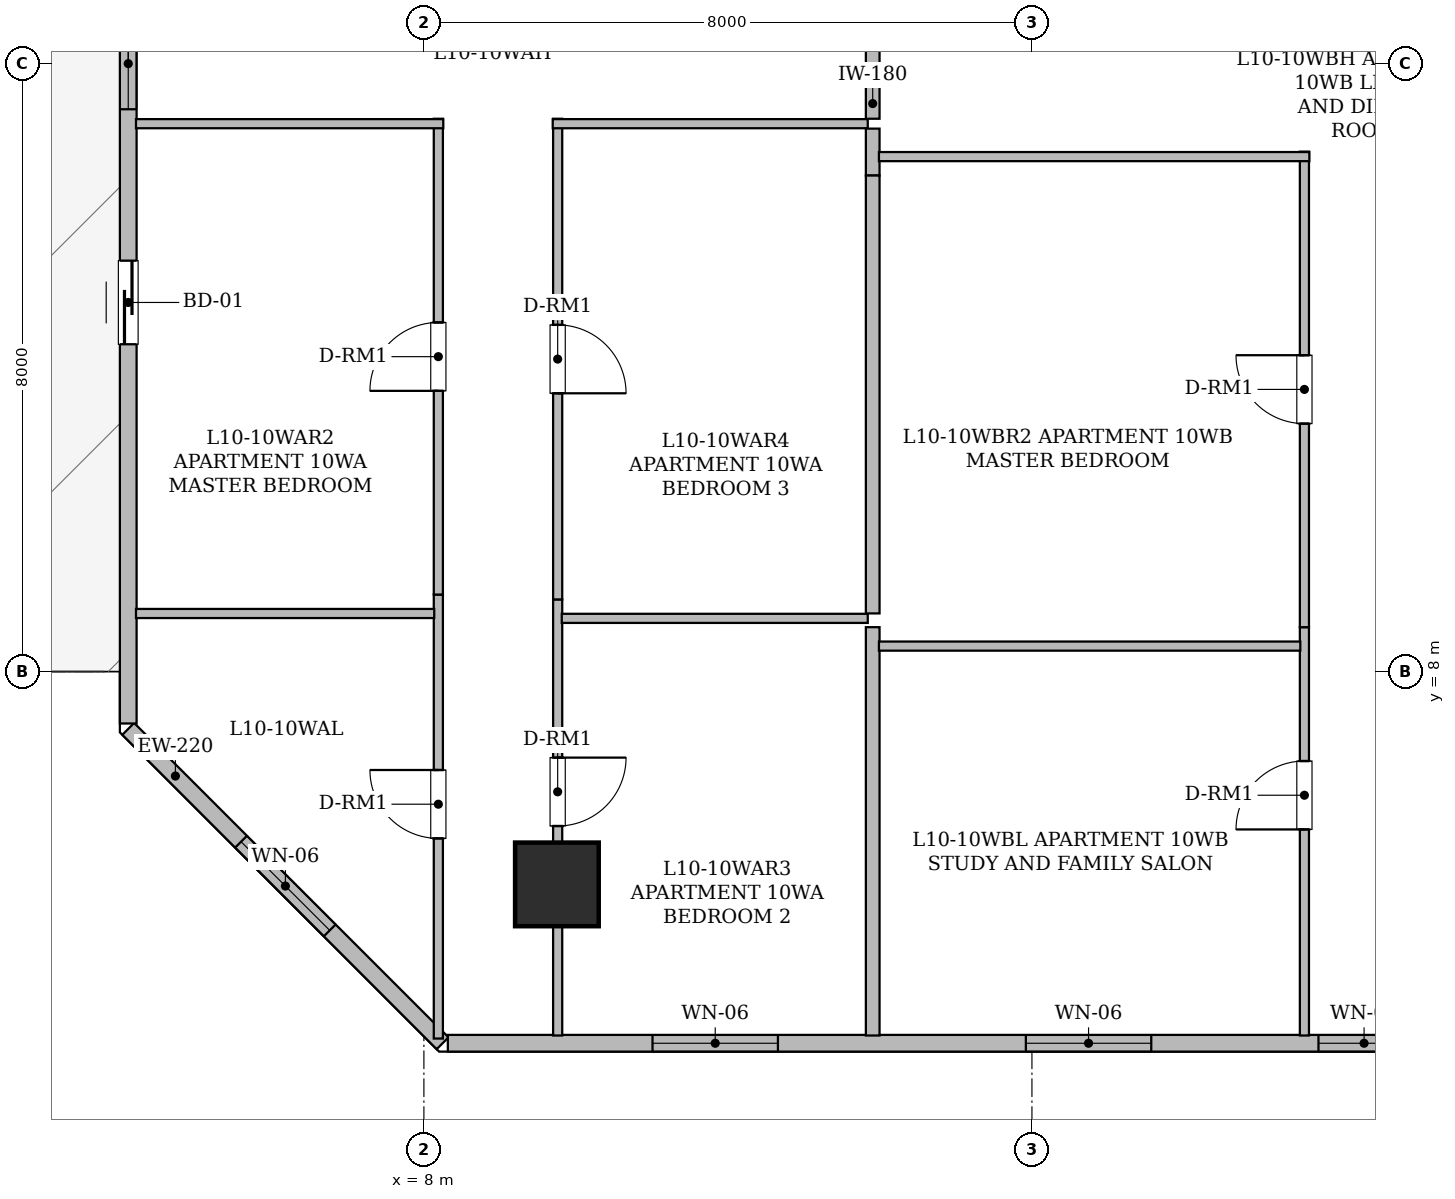
"""IFC4 building model, lengths in metres.
Left out: names, types, materials, properties, quantities, classifications, styles, units other than length and angle.
Written with IfcOpenShell. Run it as: python <this file> out.ifc"""

import sys

from ifc_helpers import new_model, si_unit, direction, frame, frame_2d, origin, origin_2d, place, context, subcontext, project, spatial, rectangle, hollow_rectangle, extrude, element, fill, save


model = new_model("IFC4")
c1 = context("Model", 3, precision=1e-05, world=origin(), true_north=direction((0.0, 1.0)))
c2 = subcontext(c1, "Body", "Model", "MODEL_VIEW")
j1 = project(units=[si_unit("LENGTHUNIT", "METRE"), si_unit("PLANEANGLEUNIT", "RADIAN")], contexts=[c1])
p1 = place(None, origin())
s1 = spatial("IfcSite", under=j1, at=p1, CompositionType="ELEMENT")
p2 = place(p1, origin())
s2 = spatial("IfcBuilding", under=s1, at=p2, CompositionType="ELEMENT")
p3 = place(p2, frame((0.0, 0.0, 44.25)))
s3 = spatial("IfcBuildingStorey", under=s2, at=p3, CompositionType="ELEMENT", Elevation=44.25)
p4 = place(p3, frame((9.75, 5.2, 0.0), z_axis=(0.0, 0.0, 1.0), x_axis=(1.0, 0.0, 0.0)))
e1 = element("IfcColumn", 1, at=p4, inside=s3, PredefinedType="COLUMN", context=c2, shape_type="SweptSolid", body=[
    extrude(hollow_rectangle(XDim=1.1, YDim=1.1, WallThickness=0.055, at=origin_2d()), origin(), (0.0, 0.0, 1.0), 3.65),
])
p5 = place(p3, frame((8.246, 3.11, 0.0), z_axis=(0.0, 0.0, 1.0), x_axis=(-0.707106781187, 0.707106781187, 0.0)))
e2 = element("IfcWall", 2, at=p5, inside=s3, PredefinedType="STANDARD", context=c2, shape_type="SweptSolid", body=[
    extrude(rectangle(XDim=5.849, YDim=0.22, at=frame_2d((2.925, 0.0))), origin(), (0.0, 0.0, 1.0), 3.43),
])
p6 = place(p5, frame((2.1, 0.0, 0.85)))
e3 = element("IfcOpeningElement", 3, at=p6, cuts=e2, PredefinedType="OPENING", context=c2, shape_type="SweptSolid", body=[
    extrude(rectangle(XDim=1.65, YDim=1.55, at=frame_2d((0.825, 0.775))), frame((0.0, 0.12, 0.0), z_axis=(0.0, -1.0, 0.0), x_axis=(1.0, 0.0, 0.0)), (0.0, 0.0, 1.0), 0.24),
])
p7 = place(p3, frame((4.11, 7.317, 0.0), z_axis=(0.0, 0.0, 1.0), x_axis=(0.0, 1.0, 0.0)))
e4 = element("IfcWall", 4, at=p7, inside=s3, PredefinedType="STANDARD", context=c2, shape_type="SweptSolid", body=[
    extrude(rectangle(XDim=17.446, YDim=0.22, at=frame_2d((8.723, 0.0))), origin(), (0.0, 0.0, 1.0), 3.43),
])
p8 = place(p7, frame((4.989, 0.0, 0.0)))
e5 = element("IfcOpeningElement", 5, at=p8, cuts=e4, PredefinedType="OPENING", context=c2, shape_type="SweptSolid", body=[
    extrude(rectangle(XDim=1.1, YDim=2.2, at=frame_2d((0.55, 1.1))), frame((0.0, 0.12, 0.0), z_axis=(0.0, -1.0, 0.0), x_axis=(1.0, 0.0, 0.0)), (0.0, 0.0, 1.0), 0.24),
])
p9 = place(p7, frame((8.081, 0.0, 0.8)))
e6 = element("IfcOpeningElement", 6, at=p9, cuts=e4, PredefinedType="OPENING", context=c2, shape_type="SweptSolid", body=[
    extrude(rectangle(XDim=1.2, YDim=1.5, at=frame_2d((0.6, 0.75))), frame((0.0, 0.12, 0.0), z_axis=(0.0, -1.0, 0.0), x_axis=(1.0, 0.0, 0.0)), (0.0, 0.0, 1.0), 0.24),
])
p10 = place(p3, frame((45.683, 3.11, 0.0), z_axis=(0.0, 0.0, 1.0), x_axis=(-1.0, 0.0, 0.0)))
e7 = element("IfcWall", 7, at=p10, inside=s3, PredefinedType="STANDARD", context=c2, shape_type="SweptSolid", body=[
    extrude(rectangle(XDim=37.368, YDim=0.22, at=frame_2d((18.684, 0.0))), origin(), (0.0, 0.0, 1.0), 3.43),
])
p11 = place(p10, frame((14.508, 0.0, 0.85)))
e8 = element("IfcOpeningElement", 8, at=p11, cuts=e7, PredefinedType="OPENING", context=c2, shape_type="SweptSolid", body=[
    extrude(rectangle(XDim=1.65, YDim=1.55, at=frame_2d((0.825, 0.775))), frame((0.0, 0.12, 0.0), z_axis=(0.0, -1.0, 0.0), x_axis=(1.0, 0.0, 0.0)), (0.0, 0.0, 1.0), 0.24),
])
p12 = place(p10, frame((33.025, 0.0, 0.85)))
e9 = element("IfcOpeningElement", 9, at=p12, cuts=e7, PredefinedType="OPENING", context=c2, shape_type="SweptSolid", body=[
    extrude(rectangle(XDim=1.65, YDim=1.55, at=frame_2d((0.825, 0.775))), frame((0.0, 0.12, 0.0), z_axis=(0.0, -1.0, 0.0), x_axis=(1.0, 0.0, 0.0)), (0.0, 0.0, 1.0), 0.24),
])
p13 = place(p10, frame((24.713, 0.0, 0.8)))
e10 = element("IfcOpeningElement", 10, at=p13, cuts=e7, PredefinedType="OPENING", context=c2, shape_type="SweptSolid", body=[
    extrude(rectangle(XDim=1.2, YDim=1.5, at=frame_2d((0.6, 0.75))), frame((0.0, 0.12, 0.0), z_axis=(0.0, -1.0, 0.0), x_axis=(1.0, 0.0, 0.0)), (0.0, 0.0, 1.0), 0.24),
])
p14 = place(p10, frame((28.113, 0.0, 0.85)))
e11 = element("IfcOpeningElement", 11, at=p14, cuts=e7, PredefinedType="OPENING", context=c2, shape_type="SweptSolid", body=[
    extrude(rectangle(XDim=1.65, YDim=1.55, at=frame_2d((0.825, 0.775))), frame((0.0, 0.12, 0.0), z_axis=(0.0, -1.0, 0.0), x_axis=(1.0, 0.0, 0.0)), (0.0, 0.0, 1.0), 0.24),
])
p15 = place(p10, frame((20.863, 0.0, 0.85)))
e12 = element("IfcOpeningElement", 12, at=p15, cuts=e7, PredefinedType="OPENING", context=c2, shape_type="SweptSolid", body=[
    extrude(rectangle(XDim=1.65, YDim=1.55, at=frame_2d((0.825, 0.775))), frame((0.0, 0.12, 0.0), z_axis=(0.0, -1.0, 0.0), x_axis=(1.0, 0.0, 0.0)), (0.0, 0.0, 1.0), 0.24),
])
p16 = place(p10, frame((10.428, 0.0, 0.8)))
e13 = element("IfcOpeningElement", 13, at=p16, cuts=e7, PredefinedType="OPENING", context=c2, shape_type="SweptSolid", body=[
    extrude(rectangle(XDim=1.2, YDim=1.5, at=frame_2d((0.6, 0.75))), frame((0.0, 0.12, 0.0), z_axis=(0.0, -1.0, 0.0), x_axis=(1.0, 0.0, 0.0)), (0.0, 0.0, 1.0), 0.24),
])
p17 = place(p10, frame((6.453, 0.0, 0.85)))
e14 = element("IfcOpeningElement", 14, at=p17, cuts=e7, PredefinedType="OPENING", context=c2, shape_type="SweptSolid", body=[
    extrude(rectangle(XDim=1.65, YDim=1.55, at=frame_2d((0.825, 0.775))), frame((0.0, 0.12, 0.0), z_axis=(0.0, -1.0, 0.0), x_axis=(1.0, 0.0, 0.0)), (0.0, 0.0, 1.0), 0.24),
])
p18 = place(p10, frame((2.157, 0.0, 0.85)))
e15 = element("IfcOpeningElement", 15, at=p18, cuts=e7, PredefinedType="OPENING", context=c2, shape_type="SweptSolid", body=[
    extrude(rectangle(XDim=1.65, YDim=1.55, at=frame_2d((0.825, 0.775))), frame((0.0, 0.12, 0.0), z_axis=(0.0, -1.0, 0.0), x_axis=(1.0, 0.0, 0.0)), (0.0, 0.0, 1.0), 0.24),
])
p19 = place(p3, frame((8.19, 3.172, 0.0), z_axis=(0.0, 0.0, 1.0), x_axis=(0.0, 1.0, 0.0)))
e16 = element("IfcWall", 16, at=p19, inside=s3, PredefinedType="PARTITIONING", context=c2, shape_type="SweptSolid", body=[
    extrude(rectangle(XDim=5.841, YDim=0.12, at=frame_2d((2.92, 0.0))), origin(), (0.0, 0.0, 1.0), 2.803),
])
p20 = place(p19, frame((2.633, 0.0, 0.0)))
e17 = element("IfcOpeningElement", 17, at=p20, cuts=e16, PredefinedType="OPENING", context=c2, shape_type="SweptSolid", body=[
    extrude(rectangle(XDim=0.9, YDim=2.1, at=frame_2d((0.45, 1.05))), frame((0.0, 0.07, 0.0), z_axis=(0.0, -1.0, 0.0), x_axis=(1.0, 0.0, 0.0)), (0.0, 0.0, 1.0), 0.14),
])
p21 = place(p3, frame((8.19, 9.013, 0.0), z_axis=(0.0, 0.0, 1.0), x_axis=(0.0, 1.0, 0.0)))
e18 = element("IfcWall", 18, at=p21, inside=s3, PredefinedType="PARTITIONING", context=c2, shape_type="SweptSolid", body=[
    extrude(rectangle(XDim=6.26, YDim=0.12, at=frame_2d((3.13, 0.0))), origin(), (0.0, 0.0, 1.0), 2.803),
])
p22 = place(p21, frame((2.68, 0.0, 0.0)))
e19 = element("IfcOpeningElement", 19, at=p22, cuts=e18, PredefinedType="OPENING", context=c2, shape_type="SweptSolid", body=[
    extrude(rectangle(XDim=0.9, YDim=2.1, at=frame_2d((0.45, 1.05))), frame((0.0, 0.07, 0.0), z_axis=(0.0, -1.0, 0.0), x_axis=(1.0, 0.0, 0.0)), (0.0, 0.0, 1.0), 0.14),
])
p23 = place(p3, frame((8.255, 15.208, 0.0), z_axis=(0.0, 0.0, 1.0), x_axis=(-1.0, 0.0, 0.0)))
e20 = element("IfcWall", 20, at=p23, inside=s3, PredefinedType="PARTITIONING", context=c2, shape_type="SweptSolid", body=[
    extrude(rectangle(XDim=4.043, YDim=0.12, at=frame_2d((2.021, 0.0))), origin(), (0.0, 0.0, 1.0), 2.803),
])
p24 = place(p3, frame((9.76, 8.949, 0.0), z_axis=(0.0, 0.0, 1.0), x_axis=(0.0, -1.0, 0.0)))
e21 = element("IfcWall", 21, at=p24, inside=s3, PredefinedType="PARTITIONING", context=c2, shape_type="SweptSolid", body=[
    extrude(rectangle(XDim=5.737, YDim=0.12, at=frame_2d((2.869, 0.0))), origin(), (0.0, 0.0, 1.0), 2.647),
])
p25 = place(p24, frame((2.081, 0.0, 0.0)))
e22 = element("IfcOpeningElement", 22, at=p25, cuts=e21, PredefinedType="OPENING", context=c2, shape_type="SweptSolid", body=[
    extrude(rectangle(XDim=0.9, YDim=2.1, at=frame_2d((0.45, 1.05))), frame((0.0, 0.07, 0.0), z_axis=(0.0, -1.0, 0.0), x_axis=(1.0, 0.0, 0.0)), (0.0, 0.0, 1.0), 0.14),
])
p26 = place(p3, frame((9.76, 15.273, 0.0), z_axis=(0.0, 0.0, 1.0), x_axis=(0.0, -1.0, 0.0)))
e23 = element("IfcWall", 23, at=p26, inside=s3, PredefinedType="PARTITIONING", context=c2, shape_type="SweptSolid", body=[
    extrude(rectangle(XDim=6.324, YDim=0.12, at=frame_2d((3.162, 0.0))), origin(), (0.0, 0.0, 1.0), 3.43),
])
p27 = place(p26, frame((2.712, 0.0, 0.0)))
e24 = element("IfcOpeningElement", 24, at=p27, cuts=e23, PredefinedType="OPENING", context=c2, shape_type="SweptSolid", body=[
    extrude(rectangle(XDim=0.9, YDim=2.1, at=frame_2d((0.45, 1.05))), frame((0.0, 0.07, 0.0), z_axis=(0.0, -1.0, 0.0), x_axis=(1.0, 0.0, 0.0)), (0.0, 0.0, 1.0), 0.14),
])
p28 = place(p3, frame((13.84, 15.208, 0.0), z_axis=(0.0, 0.0, 1.0), x_axis=(-1.0, 0.0, 0.0)))
e25 = element("IfcWall", 25, at=p28, inside=s3, PredefinedType="PARTITIONING", context=c2, shape_type="SweptSolid", body=[
    extrude(rectangle(XDim=4.145, YDim=0.12, at=frame_2d((2.073, 0.0))), origin(), (0.0, 0.0, 1.0), 3.43),
])
p29 = place(p3, frame((13.905, 16.604, 0.0), z_axis=(0.0, 0.0, 1.0), x_axis=(0.0, -1.0, 0.0)))
e26 = element("IfcWall", 26, at=p29, inside=s3, PredefinedType="STANDARD", context=c2, shape_type="SweptSolid", body=[
    extrude(rectangle(XDim=1.331, YDim=0.18, at=frame_2d((0.666, 0.0))), origin(), (0.0, 0.0, 1.0), 3.43),
])
p30 = place(p3, frame((4.212, 8.764, 0.0), z_axis=(0.0, 0.0, 1.0), x_axis=(1.0, 0.0, 0.0)))
e27 = element("IfcWall", 27, at=p30, inside=s3, PredefinedType="PARTITIONING", context=c2, shape_type="SweptSolid", body=[
    extrude(rectangle(XDim=3.924, YDim=0.12, at=frame_2d((1.962, 0.0))), origin(), (0.0, 0.0, 1.0), 3.43),
])
p31 = place(p3, frame((9.814, 8.7, 0.0), z_axis=(0.0, 0.0, 1.0), x_axis=(1.0, 0.0, 0.0)))
e28 = element("IfcWall", 28, at=p31, inside=s3, PredefinedType="PARTITIONING", context=c2, shape_type="SweptSolid", body=[
    extrude(rectangle(XDim=4.026, YDim=0.12, at=frame_2d((2.013, 0.0))), origin(), (0.0, 0.0, 1.0), 2.647),
])
p32 = place(p3, frame((13.905, 8.584, 0.0), z_axis=(0.0, 0.0, 1.0), x_axis=(0.0, -1.0, 0.0)))
e29 = element("IfcWall", 29, at=p32, inside=s3, PredefinedType="STANDARD", context=c2, shape_type="SweptSolid", body=[
    extrude(rectangle(XDim=5.372, YDim=0.18, at=frame_2d((2.686, 0.0))), origin(), (0.0, 0.0, 1.0), 2.803),
])
p33 = place(p3, frame((13.905, 15.143, 0.0), z_axis=(0.0, 0.0, 1.0), x_axis=(0.0, -1.0, 0.0)))
e30 = element("IfcWall", 30, at=p33, inside=s3, PredefinedType="STANDARD", context=c2, shape_type="SweptSolid", body=[
    extrude(rectangle(XDim=0.617, YDim=0.18, at=frame_2d((0.309, 0.0))), origin(), (0.0, 0.0, 1.0), 3.43),
])
p34 = place(p3, frame((13.905, 14.526, 0.0), z_axis=(0.0, 0.0, 1.0), x_axis=(0.0, -1.0, 0.0)))
e31 = element("IfcWall", 31, at=p34, inside=s3, PredefinedType="STANDARD", context=c2, shape_type="SweptSolid", body=[
    extrude(rectangle(XDim=5.761, YDim=0.18, at=frame_2d((2.88, 0.0))), origin(), (0.0, 0.0, 1.0), 2.647),
])
p35 = place(p3, frame((19.585, 3.212, 0.0), z_axis=(0.0, 0.0, 1.0), x_axis=(0.0, 1.0, 0.0)))
e32 = element("IfcWall", 32, at=p35, inside=s3, PredefinedType="PARTITIONING", context=c2, shape_type="SweptSolid", body=[
    extrude(rectangle(XDim=5.372, YDim=0.12, at=frame_2d((2.686, 0.0))), origin(), (0.0, 0.0, 1.0), 2.803),
])
p36 = place(p35, frame((2.711, 0.0, 0.0)))
e33 = element("IfcOpeningElement", 33, at=p36, cuts=e32, PredefinedType="OPENING", context=c2, shape_type="SweptSolid", body=[
    extrude(rectangle(XDim=0.9, YDim=2.1, at=frame_2d((0.45, 1.05))), frame((0.0, 0.07, 0.0), z_axis=(0.0, -1.0, 0.0), x_axis=(1.0, 0.0, 0.0)), (0.0, 0.0, 1.0), 0.14),
])
p37 = place(p3, frame((19.585, 8.584, 0.0), z_axis=(0.0, 0.0, 1.0), x_axis=(0.0, 1.0, 0.0)))
e34 = element("IfcWall", 34, at=p37, inside=s3, PredefinedType="PARTITIONING", context=c2, shape_type="SweptSolid", body=[
    extrude(rectangle(XDim=6.256, YDim=0.12, at=frame_2d((3.128, 0.0))), origin(), (0.0, 0.0, 1.0), 2.647),
])
p38 = place(p37, frame((2.678, 0.0, 0.0)))
e35 = element("IfcOpeningElement", 35, at=p38, cuts=e34, PredefinedType="OPENING", context=c2, shape_type="SweptSolid", body=[
    extrude(rectangle(XDim=0.9, YDim=2.1, at=frame_2d((0.45, 1.05))), frame((0.0, 0.07, 0.0), z_axis=(0.0, -1.0, 0.0), x_axis=(1.0, 0.0, 0.0)), (0.0, 0.0, 1.0), 0.14),
])
p39 = place(p3, frame((19.65, 14.775, 0.0), z_axis=(0.0, 0.0, 1.0), x_axis=(-1.0, 0.0, 0.0)))
e36 = element("IfcWall", 36, at=p39, inside=s3, PredefinedType="PARTITIONING", context=c2, shape_type="SweptSolid", body=[
    extrude(rectangle(XDim=5.663, YDim=0.12, at=frame_2d((2.832, 0.0))), origin(), (0.0, 0.0, 1.0), 2.647),
])
p40 = place(p3, frame((13.987, 8.335, 0.0), z_axis=(0.0, 0.0, 1.0), x_axis=(1.0, 0.0, 0.0)))
e37 = element("IfcWall", 37, at=p40, inside=s3, PredefinedType="PARTITIONING", context=c2, shape_type="SweptSolid", body=[
    extrude(rectangle(XDim=5.544, YDim=0.12, at=frame_2d((2.772, 0.0))), origin(), (0.0, 0.0, 1.0), 3.43),
])
p41 = place(p8, origin())
e38 = element("IfcDoor", 38, at=p41, inside=s3, OperationType="SLIDING_TO_LEFT", PredefinedType="DOOR", context=c2, shape_type="SweptSolid", body=[
    extrude(rectangle(XDim=1.1, YDim=2.2, at=frame_2d((0.55, 1.1))), frame((0.0, 0.025, 0.0), z_axis=(0.0, -1.0, 0.0), x_axis=(1.0, 0.0, 0.0)), (0.0, 0.0, 1.0), 0.05),
])
fill(e5, e38)
p42 = place(p9, origin())
e39 = element("IfcWindow", 39, at=p42, inside=s3, PartitioningType="SINGLE_PANEL", PredefinedType="WINDOW", context=c2, shape_type="SweptSolid", body=[
    extrude(rectangle(XDim=1.2, YDim=1.5, at=frame_2d((0.6, 0.75))), frame((0.0, 0.03, 0.0), z_axis=(0.0, -1.0, 0.0), x_axis=(1.0, 0.0, 0.0)), (0.0, 0.0, 1.0), 0.06),
])
fill(e6, e39)
p43 = place(p6, origin())
e40 = element("IfcWindow", 40, at=p43, inside=s3, PartitioningType="SINGLE_PANEL", PredefinedType="WINDOW", context=c2, shape_type="SweptSolid", body=[
    extrude(rectangle(XDim=1.65, YDim=1.55, at=frame_2d((0.825, 0.775))), frame((0.0, 0.03, 0.0), z_axis=(0.0, -1.0, 0.0), x_axis=(1.0, 0.0, 0.0)), (0.0, 0.0, 1.0), 0.06),
])
fill(e3, e40)
p44 = place(p12, origin())
e41 = element("IfcWindow", 41, at=p44, inside=s3, PartitioningType="SINGLE_PANEL", PredefinedType="WINDOW", context=c2, shape_type="SweptSolid", body=[
    extrude(rectangle(XDim=1.65, YDim=1.55, at=frame_2d((0.825, 0.775))), frame((0.0, 0.03, 0.0), z_axis=(0.0, -1.0, 0.0), x_axis=(1.0, 0.0, 0.0)), (0.0, 0.0, 1.0), 0.06),
])
fill(e9, e41)
p45 = place(p13, origin())
e42 = element("IfcWindow", 42, at=p45, inside=s3, PartitioningType="SINGLE_PANEL", PredefinedType="WINDOW", context=c2, shape_type="SweptSolid", body=[
    extrude(rectangle(XDim=1.2, YDim=1.5, at=frame_2d((0.6, 0.75))), frame((0.0, 0.03, 0.0), z_axis=(0.0, -1.0, 0.0), x_axis=(1.0, 0.0, 0.0)), (0.0, 0.0, 1.0), 0.06),
])
fill(e10, e42)
p46 = place(p14, origin())
e43 = element("IfcWindow", 43, at=p46, inside=s3, PartitioningType="SINGLE_PANEL", PredefinedType="WINDOW", context=c2, shape_type="SweptSolid", body=[
    extrude(rectangle(XDim=1.65, YDim=1.55, at=frame_2d((0.825, 0.775))), frame((0.0, 0.03, 0.0), z_axis=(0.0, -1.0, 0.0), x_axis=(1.0, 0.0, 0.0)), (0.0, 0.0, 1.0), 0.06),
])
fill(e11, e43)
p47 = place(p20, origin())
e44 = element("IfcDoor", 44, at=p47, inside=s3, OperationType="SINGLE_SWING_RIGHT", PredefinedType="DOOR", context=c2, shape_type="SweptSolid", body=[
    extrude(rectangle(XDim=0.9, YDim=2.1, at=frame_2d((0.45, 1.05))), frame((0.0, 0.025, 0.0), z_axis=(0.0, -1.0, 0.0), x_axis=(1.0, 0.0, 0.0)), (0.0, 0.0, 1.0), 0.05),
])
fill(e17, e44)
p48 = place(p22, origin())
e45 = element("IfcDoor", 45, at=p48, inside=s3, OperationType="SINGLE_SWING_LEFT", PredefinedType="DOOR", context=c2, shape_type="SweptSolid", body=[
    extrude(rectangle(XDim=0.9, YDim=2.1, at=frame_2d((0.45, 1.05))), frame((0.0, 0.025, 0.0), z_axis=(0.0, -1.0, 0.0), x_axis=(1.0, 0.0, 0.0)), (0.0, 0.0, 1.0), 0.05),
])
fill(e19, e45)
p49 = place(p25, origin())
e46 = element("IfcDoor", 46, at=p49, inside=s3, OperationType="SINGLE_SWING_LEFT", PredefinedType="DOOR", context=c2, shape_type="SweptSolid", body=[
    extrude(rectangle(XDim=0.9, YDim=2.1, at=frame_2d((0.45, 1.05))), frame((0.0, 0.025, 0.0), z_axis=(0.0, -1.0, 0.0), x_axis=(1.0, 0.0, 0.0)), (0.0, 0.0, 1.0), 0.05),
])
fill(e22, e46)
p50 = place(p27, origin())
e47 = element("IfcDoor", 47, at=p50, inside=s3, OperationType="SINGLE_SWING_RIGHT", PredefinedType="DOOR", context=c2, shape_type="SweptSolid", body=[
    extrude(rectangle(XDim=0.9, YDim=2.1, at=frame_2d((0.45, 1.05))), frame((0.0, 0.025, 0.0), z_axis=(0.0, -1.0, 0.0), x_axis=(1.0, 0.0, 0.0)), (0.0, 0.0, 1.0), 0.05),
])
fill(e24, e47)
p51 = place(p36, origin())
e48 = element("IfcDoor", 48, at=p51, inside=s3, OperationType="SINGLE_SWING_LEFT", PredefinedType="DOOR", context=c2, shape_type="SweptSolid", body=[
    extrude(rectangle(XDim=0.9, YDim=2.1, at=frame_2d((0.45, 1.05))), frame((0.0, 0.025, 0.0), z_axis=(0.0, -1.0, 0.0), x_axis=(1.0, 0.0, 0.0)), (0.0, 0.0, 1.0), 0.05),
])
fill(e33, e48)
p52 = place(p38, origin())
e49 = element("IfcDoor", 49, at=p52, inside=s3, OperationType="SINGLE_SWING_RIGHT", PredefinedType="DOOR", context=c2, shape_type="SweptSolid", body=[
    extrude(rectangle(XDim=0.9, YDim=2.1, at=frame_2d((0.45, 1.05))), frame((0.0, 0.025, 0.0), z_axis=(0.0, -1.0, 0.0), x_axis=(1.0, 0.0, 0.0)), (0.0, 0.0, 1.0), 0.05),
])
fill(e35, e49)
save(model, sys.argv[1])
